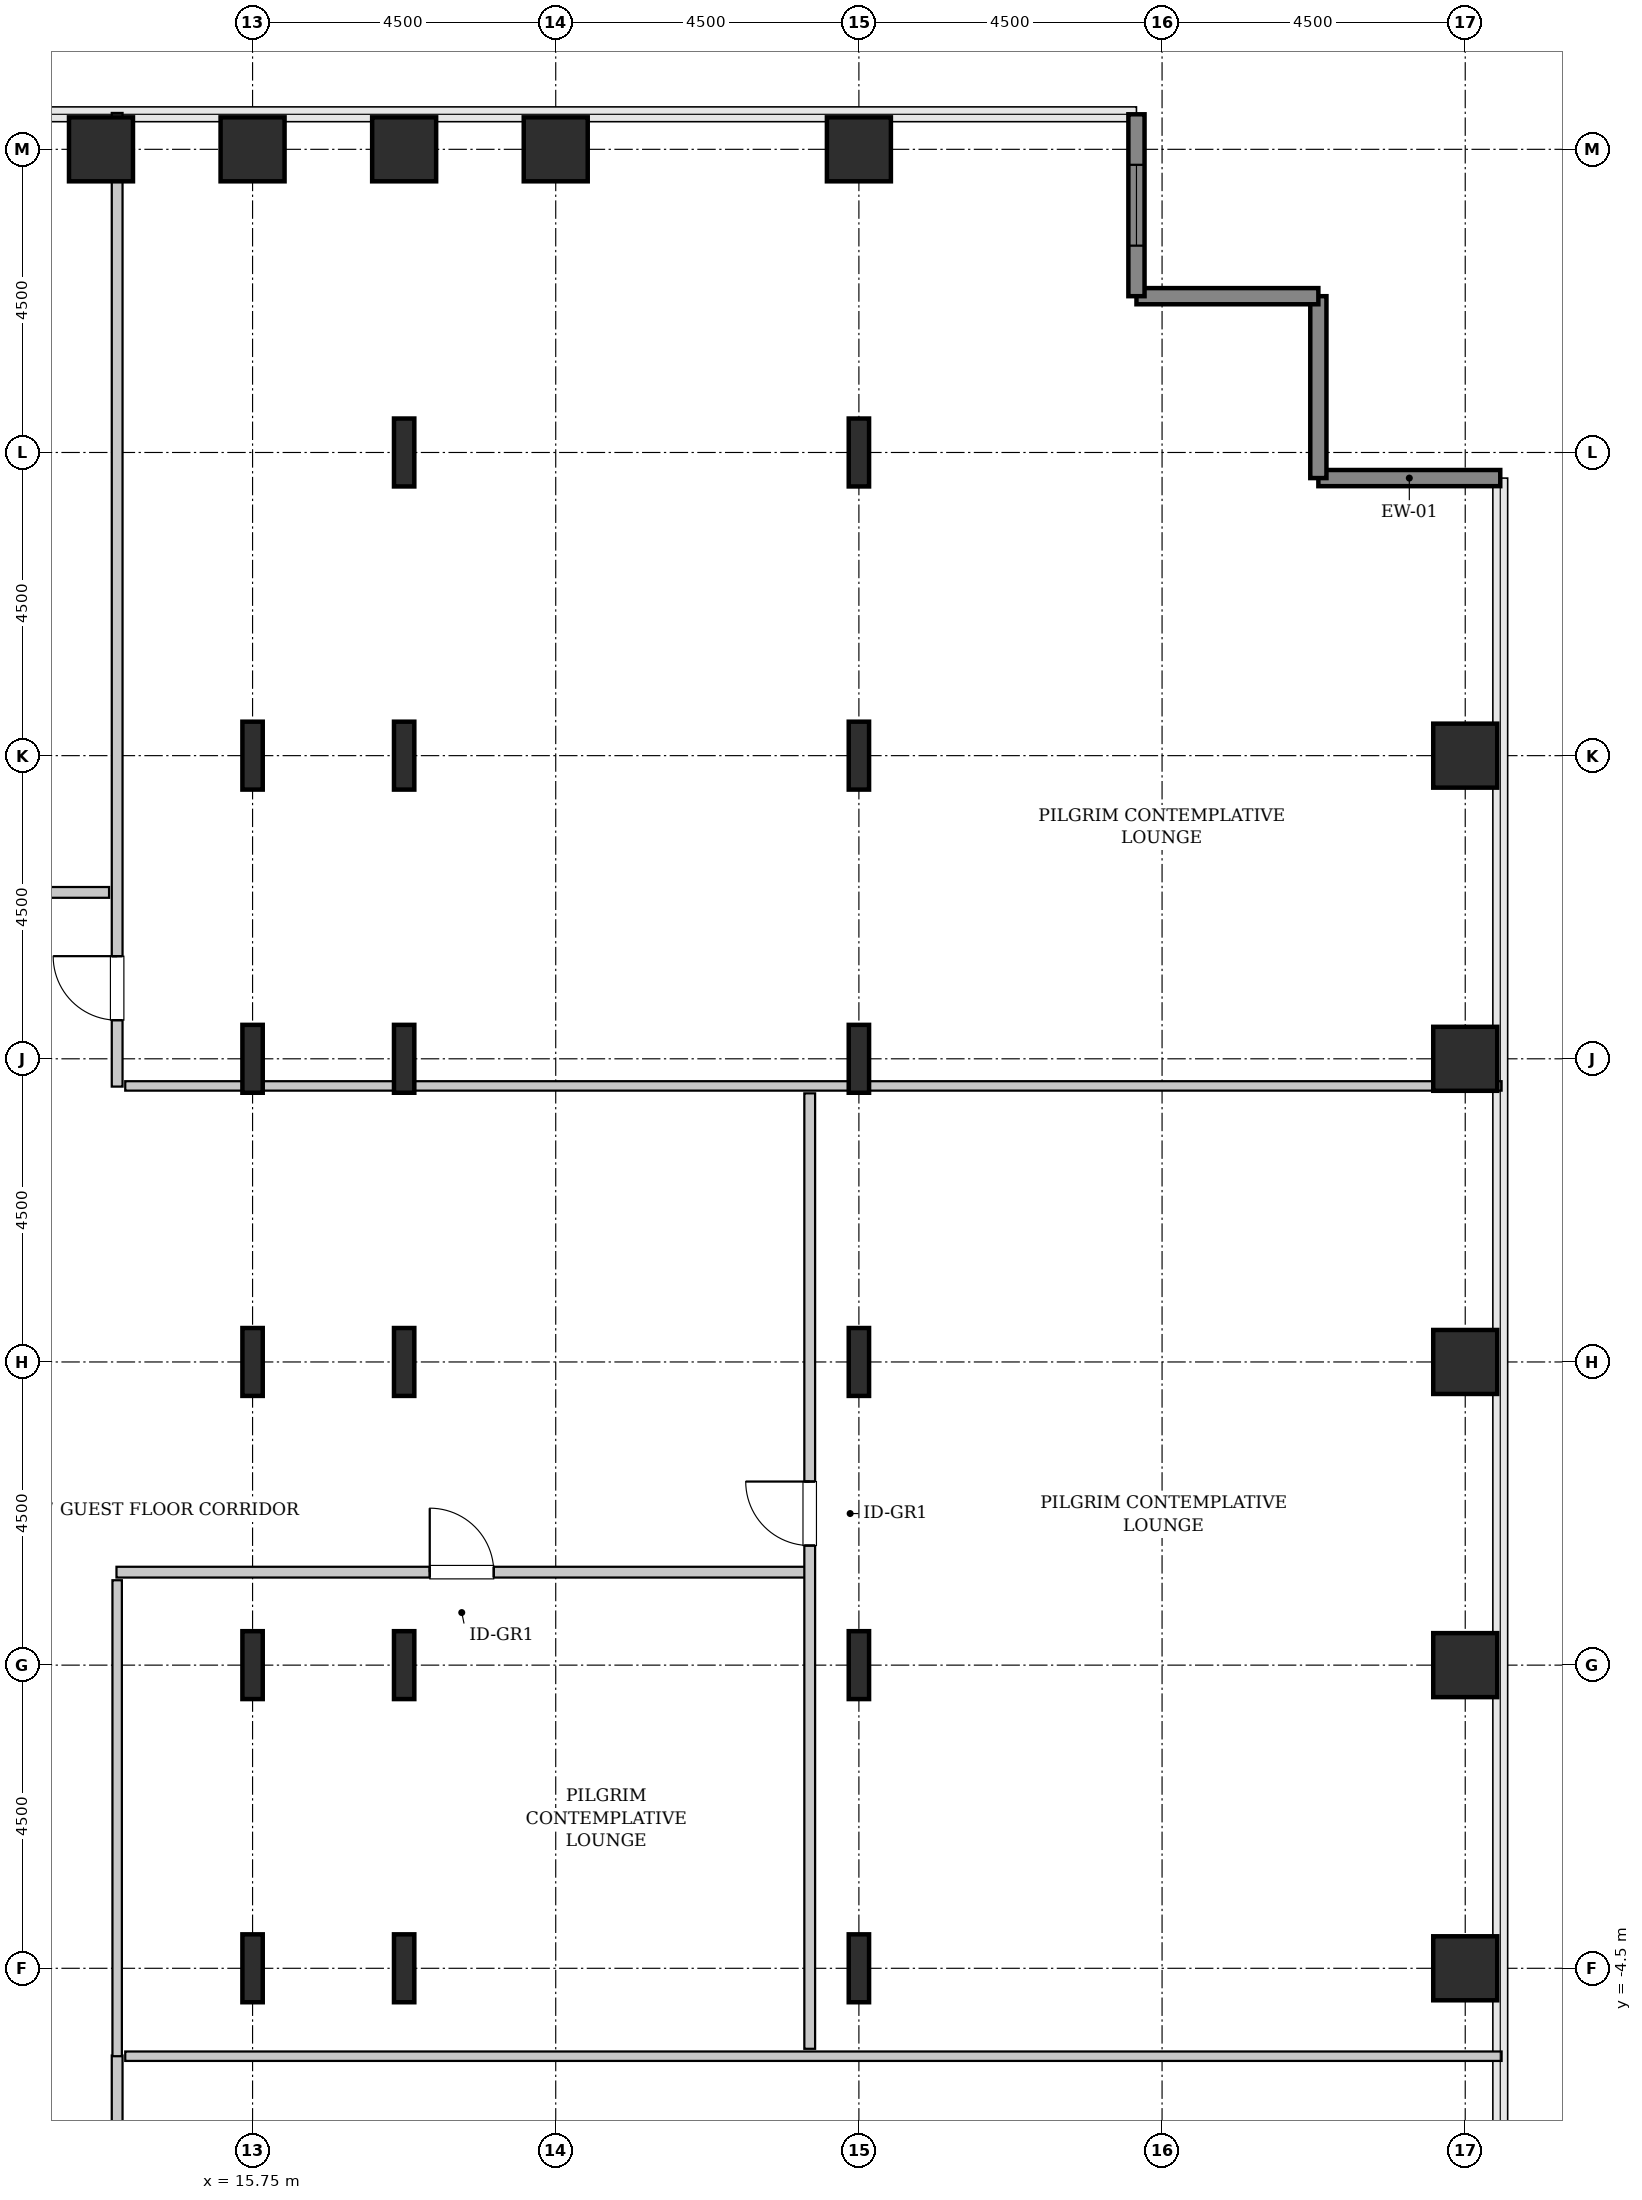
"""IFC4 building model, lengths in metres.
Left out: names, types, materials, properties, quantities, classifications, styles, units other than length and angle.
Written with IfcOpenShell. Run it as: python <this file> out.ifc"""

import sys

from ifc_helpers import new_model, si_unit, direction, frame, frame_2d, origin, origin_2d, place, context, subcontext, project, spatial, rectangle, hollow_rectangle, i_section, extrude, source, transform, mapped, element, fill, save


model = new_model("IFC4")
c1 = context("Model", 3, precision=1e-05, world=origin(), true_north=direction((0.0, 1.0)))
c2 = subcontext(c1, "Body", "Model", "MODEL_VIEW")
j1 = project(units=[si_unit("LENGTHUNIT", "METRE"), si_unit("PLANEANGLEUNIT", "RADIAN")], contexts=[c1])
p1 = place(None, origin())
s1 = spatial("IfcSite", under=j1, at=p1, CompositionType="ELEMENT")
p2 = place(p1, origin())
s2 = spatial("IfcBuilding", under=s1, at=p2, CompositionType="ELEMENT")
p3 = place(p2, frame((0.0, 0.0, 74.8)))
s3 = spatial("IfcBuildingStorey", under=s2, at=p3, CompositionType="ELEMENT", Elevation=74.8)
m1 = source(origin(), c2, "Body", "SweptSolid", [
    extrude(hollow_rectangle(XDim=0.95, YDim=0.95, WallThickness=0.045, InnerFilletRadius=0.045, OuterFilletRadius=0.09, at=origin_2d()), origin(), (0.0, 0.0, 1.0), 3.8),
])
p4 = place(p3, frame((13.5, 22.5, 0.0), z_axis=(0.0, 0.0, 1.0), x_axis=(1.0, 0.0, 0.0)))
e1 = element("IfcColumn", 1, at=p4, inside=s3, PredefinedType="COLUMN", context=c2, shape_type="MappedRepresentation", body=[
    mapped(m1, transform((0.0, 0.0, 0.0), x_axis=(1.0, 0.0, 0.0), y_axis=(0.0, 1.0, 0.0), z_axis=(0.0, 0.0, 1.0), scale=1.0)),
])
m2 = source(origin(), c2, "Body", "SweptSolid", [
    extrude(i_section(OverallWidth=0.302, OverallDepth=1.008, WebThickness=0.021, FlangeThickness=0.04, FilletRadius=0.03, at=origin_2d()), origin(), (0.0, 0.0, 1.0), 3.8),
])
for number, where, z_axis, x_axis in (
    (2, (15.75, -4.5, 0.0), (0.0, 0.0, 1.0), (1.0, 0.0, 0.0)),
    (3, (15.75, 0.0, 0.0), (0.0, 0.0, 1.0), (1.0, 0.0, 0.0)),
    (4, (15.75, 4.5, 0.0), (0.0, 0.0, 1.0), (1.0, 0.0, 0.0)),
    (5, (15.75, 9.0, 0.0), (0.0, 0.0, 1.0), (1.0, 0.0, 0.0)),
    (6, (15.75, 13.5, 0.0), (0.0, 0.0, 1.0), (1.0, 0.0, 0.0)),
):
    element("IfcColumn", number, at=place(p3, frame(where, z_axis=z_axis, x_axis=x_axis)), inside=s3, PredefinedType="COLUMN", context=c2, shape_type="MappedRepresentation", body=[
        mapped(m2, transform((0.0, 0.0, 0.0), x_axis=(1.0, 0.0, 0.0), y_axis=(0.0, 1.0, 0.0), z_axis=(0.0, 0.0, 1.0), scale=1.0)),
    ])
p5 = place(p3, frame((15.75, 22.5, 0.0), z_axis=(0.0, 0.0, 1.0), x_axis=(1.0, 0.0, 0.0)))
e7 = element("IfcColumn", 7, at=p5, inside=s3, PredefinedType="COLUMN", context=c2, shape_type="MappedRepresentation", body=[
    mapped(m1, transform((0.0, 0.0, 0.0), x_axis=(1.0, 0.0, 0.0), y_axis=(0.0, 1.0, 0.0), z_axis=(0.0, 0.0, 1.0), scale=1.0)),
])
for number, where, z_axis, x_axis in (
    (8, (18.0, -4.5, 0.0), (0.0, 0.0, 1.0), (1.0, 0.0, 0.0)),
    (9, (18.0, 0.0, 0.0), (0.0, 0.0, 1.0), (1.0, 0.0, 0.0)),
    (10, (18.0, 4.5, 0.0), (0.0, 0.0, 1.0), (1.0, 0.0, 0.0)),
    (11, (18.0, 9.0, 0.0), (0.0, 0.0, 1.0), (1.0, 0.0, 0.0)),
    (12, (18.0, 13.5, 0.0), (0.0, 0.0, 1.0), (1.0, 0.0, 0.0)),
    (13, (18.0, 18.0, 0.0), (0.0, 0.0, 1.0), (1.0, 0.0, 0.0)),
):
    element("IfcColumn", number, at=place(p3, frame(where, z_axis=z_axis, x_axis=x_axis)), inside=s3, PredefinedType="COLUMN", context=c2, shape_type="MappedRepresentation", body=[
        mapped(m2, transform((0.0, 0.0, 0.0), x_axis=(1.0, 0.0, 0.0), y_axis=(0.0, 1.0, 0.0), z_axis=(0.0, 0.0, 1.0), scale=1.0)),
    ])
for number, where, z_axis, x_axis in (
    (14, (18.0, 22.5, 0.0), (0.0, 0.0, 1.0), (1.0, 0.0, 0.0)),
    (15, (20.25, 22.5, 0.0), (0.0, 0.0, 1.0), (1.0, 0.0, 0.0)),
):
    element("IfcColumn", number, at=place(p3, frame(where, z_axis=z_axis, x_axis=x_axis)), inside=s3, PredefinedType="COLUMN", context=c2, shape_type="MappedRepresentation", body=[
        mapped(m1, transform((0.0, 0.0, 0.0), x_axis=(1.0, 0.0, 0.0), y_axis=(0.0, 1.0, 0.0), z_axis=(0.0, 0.0, 1.0), scale=1.0)),
    ])
for number, where, z_axis, x_axis in (
    (16, (24.75, -4.5, 0.0), (0.0, 0.0, 1.0), (1.0, 0.0, 0.0)),
    (17, (24.75, 0.0, 0.0), (0.0, 0.0, 1.0), (1.0, 0.0, 0.0)),
    (18, (24.75, 4.5, 0.0), (0.0, 0.0, 1.0), (1.0, 0.0, 0.0)),
    (19, (24.75, 9.0, 0.0), (0.0, 0.0, 1.0), (1.0, 0.0, 0.0)),
    (20, (24.75, 13.5, 0.0), (0.0, 0.0, 1.0), (1.0, 0.0, 0.0)),
    (21, (24.75, 18.0, 0.0), (0.0, 0.0, 1.0), (1.0, 0.0, 0.0)),
):
    element("IfcColumn", number, at=place(p3, frame(where, z_axis=z_axis, x_axis=x_axis)), inside=s3, PredefinedType="COLUMN", context=c2, shape_type="MappedRepresentation", body=[
        mapped(m2, transform((0.0, 0.0, 0.0), x_axis=(1.0, 0.0, 0.0), y_axis=(0.0, 1.0, 0.0), z_axis=(0.0, 0.0, 1.0), scale=1.0)),
    ])
for number, where, z_axis, x_axis in (
    (22, (24.75, 22.5, 0.0), (0.0, 0.0, 1.0), (1.0, 0.0, 0.0)),
    (23, (33.75, -4.5, 0.0), (0.0, 0.0, 1.0), (1.0, 0.0, 0.0)),
    (24, (33.75, 0.0, 0.0), (0.0, 0.0, 1.0), (1.0, 0.0, 0.0)),
    (25, (33.75, 4.5, 0.0), (0.0, 0.0, 1.0), (1.0, 0.0, 0.0)),
    (26, (33.75, 9.0, 0.0), (0.0, 0.0, 1.0), (1.0, 0.0, 0.0)),
    (27, (33.75, 13.5, 0.0), (0.0, 0.0, 1.0), (1.0, 0.0, 0.0)),
):
    element("IfcColumn", number, at=place(p3, frame(where, z_axis=z_axis, x_axis=x_axis)), inside=s3, PredefinedType="COLUMN", context=c2, shape_type="MappedRepresentation", body=[
        mapped(m1, transform((0.0, 0.0, 0.0), x_axis=(1.0, 0.0, 0.0), y_axis=(0.0, 1.0, 0.0), z_axis=(0.0, 0.0, 1.0), scale=1.0)),
    ])
m3 = source(origin(), c2, "Body", "SweptSolid", [
    extrude(rectangle(XDim=2.7, YDim=0.24, at=frame_2d((1.35, 0.0))), origin(), (0.0, 0.0, 1.0), 3.55),
])
for number, where, z_axis, x_axis in (
    (28, (34.27, 17.62, 0.0), (0.0, 0.0, 1.0), (-1.0, 0.0, 0.0)),
    (29, (31.57, 17.62, 0.0), (0.0, 0.0, 1.0), (0.0, 1.0, 0.0)),
    (30, (31.57, 20.32, 0.0), (0.0, 0.0, 1.0), (-1.0, 0.0, 0.0)),
):
    element("IfcWall", number, at=place(p3, frame(where, z_axis=z_axis, x_axis=x_axis)), inside=s3, PredefinedType="SHEAR", context=c2, shape_type="MappedRepresentation", body=[
        mapped(m3, transform((0.0, 0.0, 0.0), x_axis=(1.0, 0.0, 0.0), y_axis=(0.0, 1.0, 0.0), z_axis=(0.0, 0.0, 1.0), scale=1.0)),
    ])
p6 = place(p3, frame((28.87, 20.32, 0.0), z_axis=(0.0, 0.0, 1.0), x_axis=(0.0, 1.0, 0.0)))
e31 = element("IfcWall", 31, at=p6, inside=s3, PredefinedType="SHEAR", context=c2, shape_type="MappedRepresentation", body=[
    mapped(m3, transform((0.0, 0.0, 0.0), x_axis=(1.0, 0.0, 0.0), y_axis=(0.0, 1.0, 0.0), z_axis=(0.0, 0.0, 1.0), scale=1.0)),
])
p7 = place(p6, frame((0.75, 0.0, 0.85)))
e32 = element("IfcOpeningElement", 32, at=p7, cuts=e31, PredefinedType="OPENING", context=c2, shape_type="SweptSolid", body=[
    extrude(rectangle(XDim=1.2, YDim=1.8, at=frame_2d((0.6, 0.9))), frame((0.0, 0.13, 0.0), z_axis=(0.0, -1.0, 0.0), x_axis=(1.0, 0.0, 0.0)), (0.0, 0.0, 1.0), 0.26),
])
m4 = source(origin(), c2, "Body", "SweptSolid", [
    extrude(rectangle(XDim=17.245, YDim=0.16, at=frame_2d((8.623, 0.0))), origin(), (0.0, 0.0, 1.0), 3.535),
])
p8 = place(p3, frame((13.74, -23.04, 0.0), z_axis=(0.0, 0.0, 1.0), x_axis=(0.0, 1.0, 0.0)))
e33 = element("IfcWall", 33, at=p8, inside=s3, PredefinedType="PARTITIONING", context=c2, shape_type="MappedRepresentation", body=[
    mapped(m4, transform((0.0, 0.0, 0.0), x_axis=(1.0, 0.0, 0.0), y_axis=(0.0, 1.0, 0.0), z_axis=(0.0, 0.0, 1.0), scale=1.0)),
])
p9 = place(p8, frame((13.913, 0.0, 0.0)))
e34 = element("IfcOpeningElement", 34, at=p9, cuts=e33, PredefinedType="OPENING", context=c2, shape_type="SweptSolid", body=[
    extrude(rectangle(XDim=0.95, YDim=2.1, at=frame_2d((0.475, 1.05))), frame((0.0, 0.09, 0.0), z_axis=(0.0, -1.0, 0.0), x_axis=(1.0, 0.0, 0.0)), (0.0, 0.0, 1.0), 0.18),
])
m5 = source(origin(), c2, "Body", "SweptSolid", [
    extrude(rectangle(XDim=20.43, YDim=0.14, at=frame_2d((10.215, 0.0))), origin(), (0.0, 0.0, 1.0), 3.535),
])
p10 = place(p3, frame((13.86, -5.805, 0.0), z_axis=(0.0, 0.0, 1.0), x_axis=(1.0, 0.0, 0.0)))
e35 = element("IfcWall", 35, at=p10, inside=s3, PredefinedType="PARTITIONING", context=c2, shape_type="MappedRepresentation", body=[
    mapped(m5, transform((0.0, 0.0, 0.0), x_axis=(1.0, 0.0, 0.0), y_axis=(0.0, 1.0, 0.0), z_axis=(0.0, 0.0, 1.0), scale=1.0)),
])
m6 = source(origin(), c2, "Body", "SweptSolid", [
    extrude(rectangle(XDim=14.453, YDim=0.16, at=frame_2d((7.226, 0.0))), origin(), (0.0, 0.0, 1.0), 3.535),
])
p11 = place(p3, frame((13.74, 8.587, 0.0), z_axis=(0.0, 0.0, 1.0), x_axis=(0.0, 1.0, 0.0)))
e36 = element("IfcWall", 36, at=p11, inside=s3, PredefinedType="PARTITIONING", context=c2, shape_type="MappedRepresentation", body=[
    mapped(m6, transform((0.0, 0.0, 0.0), x_axis=(1.0, 0.0, 0.0), y_axis=(0.0, 1.0, 0.0), z_axis=(0.0, 0.0, 1.0), scale=1.0)),
])
p12 = place(p11, frame((0.986, 0.0, 0.0)))
e37 = element("IfcOpeningElement", 37, at=p12, cuts=e36, PredefinedType="OPENING", context=c2, shape_type="SweptSolid", body=[
    extrude(rectangle(XDim=0.95, YDim=2.1, at=frame_2d((0.475, 1.05))), frame((0.0, 0.09, 0.0), z_axis=(0.0, -1.0, 0.0), x_axis=(1.0, 0.0, 0.0)), (0.0, 0.0, 1.0), 0.18),
])
m7 = source(origin(), c2, "Body", "SweptSolid", [
    extrude(rectangle(XDim=20.43, YDim=0.14, at=frame_2d((10.215, 0.0))), origin(), (0.0, 0.0, 1.0), 2.825),
])
p13 = place(p3, frame((13.86, 8.597, 0.0), z_axis=(0.0, 0.0, 1.0), x_axis=(1.0, 0.0, 0.0)))
e38 = element("IfcWall", 38, at=p13, inside=s3, PredefinedType="PARTITIONING", context=c2, shape_type="MappedRepresentation", body=[
    mapped(m7, transform((0.0, 0.0, 0.0), x_axis=(1.0, 0.0, 0.0), y_axis=(0.0, 1.0, 0.0), z_axis=(0.0, 0.0, 1.0), scale=1.0)),
])
m8 = source(origin(), c2, "Body", "SweptSolid", [
    extrude(rectangle(XDim=10.25, YDim=0.16, at=frame_2d((5.125, 0.0))), origin(), (0.0, 0.0, 1.0), 3.535),
])
p14 = place(p3, frame((13.73, 1.38, 0.0), z_axis=(0.0, 0.0, 1.0), x_axis=(1.0, 0.0, 0.0)))
e39 = element("IfcWall", 39, at=p14, inside=s3, PredefinedType="PARTITIONING", context=c2, shape_type="MappedRepresentation", body=[
    mapped(m8, transform((0.0, 0.0, 0.0), x_axis=(1.0, 0.0, 0.0), y_axis=(0.0, 1.0, 0.0), z_axis=(0.0, 0.0, 1.0), scale=1.0)),
])
p15 = place(p14, frame((4.65, 0.0, 0.0)))
e40 = element("IfcOpeningElement", 40, at=p15, cuts=e39, PredefinedType="OPENING", context=c2, shape_type="SweptSolid", body=[
    extrude(rectangle(XDim=0.95, YDim=2.1, at=frame_2d((0.475, 1.05))), frame((0.0, 0.09, 0.0), z_axis=(0.0, -1.0, 0.0), x_axis=(1.0, 0.0, 0.0)), (0.0, 0.0, 1.0), 0.18),
])
m9 = source(origin(), c2, "Body", "SweptSolid", [
    extrude(rectangle(XDim=7.065, YDim=0.14, at=frame_2d((3.532, 0.0))), origin(), (0.0, 0.0, 1.0), 3.535),
])
p16 = place(p3, frame((13.74, -5.805, 0.0), z_axis=(0.0, 0.0, 1.0), x_axis=(0.0, 1.0, 0.0)))
e41 = element("IfcWall", 41, at=p16, inside=s3, PredefinedType="PARTITIONING", context=c2, shape_type="MappedRepresentation", body=[
    mapped(m9, transform((0.0, 0.0, 0.0), x_axis=(1.0, 0.0, 0.0), y_axis=(0.0, 1.0, 0.0), z_axis=(0.0, 0.0, 1.0), scale=1.0)),
])
m10 = source(origin(), c2, "Body", "SweptSolid", [
    extrude(rectangle(XDim=14.183, YDim=0.16, at=frame_2d((7.091, 0.0))), origin(), (0.0, 0.0, 1.0), 3.535),
])
p17 = place(p3, frame((24.02, -5.695, 0.0), z_axis=(0.0, 0.0, 1.0), x_axis=(0.0, 1.0, 0.0)))
e42 = element("IfcWall", 42, at=p17, inside=s3, PredefinedType="PARTITIONING", context=c2, shape_type="MappedRepresentation", body=[
    mapped(m10, transform((0.0, 0.0, 0.0), x_axis=(1.0, 0.0, 0.0), y_axis=(0.0, 1.0, 0.0), z_axis=(0.0, 0.0, 1.0), scale=1.0)),
])
p18 = place(p17, frame((7.47, 0.0, 0.0)))
e43 = element("IfcOpeningElement", 43, at=p18, cuts=e42, PredefinedType="OPENING", context=c2, shape_type="SweptSolid", body=[
    extrude(rectangle(XDim=0.95, YDim=2.1, at=frame_2d((0.475, 1.05))), frame((0.0, 0.09, 0.0), z_axis=(0.0, -1.0, 0.0), x_axis=(1.0, 0.0, 0.0)), (0.0, 0.0, 1.0), 0.18),
])
m11 = source(origin(), c2, "Body", "SweptSolid", [
    extrude(rectangle(XDim=5.225, YDim=0.16, at=frame_2d((2.613, 0.0))), origin(), (0.0, 0.0, 1.0), 3.535),
])
p19 = place(p3, frame((8.395, 11.47, 0.0), z_axis=(0.0, 0.0, 1.0), x_axis=(1.0, 0.0, 0.0)))
e44 = element("IfcWall", 44, at=p19, inside=s3, PredefinedType="PARTITIONING", context=c2, shape_type="MappedRepresentation", body=[
    mapped(m11, transform((0.0, 0.0, 0.0), x_axis=(1.0, 0.0, 0.0), y_axis=(0.0, 1.0, 0.0), z_axis=(0.0, 0.0, 1.0), scale=1.0)),
])
p20 = place(p19, frame((2.137, 0.0, 0.0)))
e45 = element("IfcOpeningElement", 45, at=p20, cuts=e44, PredefinedType="OPENING", context=c2, shape_type="SweptSolid", body=[
    extrude(rectangle(XDim=0.95, YDim=2.1, at=frame_2d((0.475, 1.05))), frame((0.0, 0.09, 0.0), z_axis=(0.0, -1.0, 0.0), x_axis=(1.0, 0.0, 0.0)), (0.0, 0.0, 1.0), 0.18),
])
m12 = source(origin(), c2, "Body", "SweptSolid", [
    extrude(rectangle(XDim=1.2, YDim=1.8, at=frame_2d((0.6, 0.9))), frame((0.0, 0.03, 0.0), z_axis=(0.0, -1.0, 0.0), x_axis=(1.0, 0.0, 0.0)), (0.0, 0.0, 1.0), 0.06),
])
p21 = place(p7, origin())
e46 = element("IfcWindow", 46, at=p21, inside=s3, PartitioningType="SINGLE_PANEL", PredefinedType="WINDOW", context=c2, shape_type="MappedRepresentation", body=[
    mapped(m12, transform((0.0, 0.0, 0.0), x_axis=(1.0, 0.0, 0.0), y_axis=(0.0, 1.0, 0.0), z_axis=(0.0, 0.0, 1.0), scale=1.0)),
])
fill(e32, e46)
m13 = source(origin(), c2, "Body", "SweptSolid", [
    extrude(rectangle(XDim=0.95, YDim=2.1, at=frame_2d((0.475, 1.05))), frame((0.0, 0.025, 0.0), z_axis=(0.0, -1.0, 0.0), x_axis=(1.0, 0.0, 0.0)), (0.0, 0.0, 1.0), 0.05),
])
p22 = place(p12, origin())
e47 = element("IfcDoor", 47, at=p22, inside=s3, OperationType="SINGLE_SWING_RIGHT", PredefinedType="DOOR", context=c2, shape_type="MappedRepresentation", body=[
    mapped(m13, transform((0.0, 0.0, 0.0), x_axis=(1.0, 0.0, 0.0), y_axis=(0.0, 1.0, 0.0), z_axis=(0.0, 0.0, 1.0), scale=1.0)),
])
fill(e37, e47)
p23 = place(p15, origin())
e48 = element("IfcDoor", 48, at=p23, inside=s3, OperationType="SINGLE_SWING_LEFT", PredefinedType="DOOR", context=c2, shape_type="MappedRepresentation", body=[
    mapped(m13, transform((0.0, 0.0, 0.0), x_axis=(1.0, 0.0, 0.0), y_axis=(0.0, 1.0, 0.0), z_axis=(0.0, 0.0, 1.0), scale=1.0)),
])
fill(e40, e48)
p24 = place(p18, origin())
e49 = element("IfcDoor", 49, at=p24, inside=s3, OperationType="SINGLE_SWING_RIGHT", PredefinedType="DOOR", context=c2, shape_type="MappedRepresentation", body=[
    mapped(m13, transform((0.0, 0.0, 0.0), x_axis=(1.0, 0.0, 0.0), y_axis=(0.0, 1.0, 0.0), z_axis=(0.0, 0.0, 1.0), scale=1.0)),
])
fill(e43, e49)
save(model, sys.argv[1])
